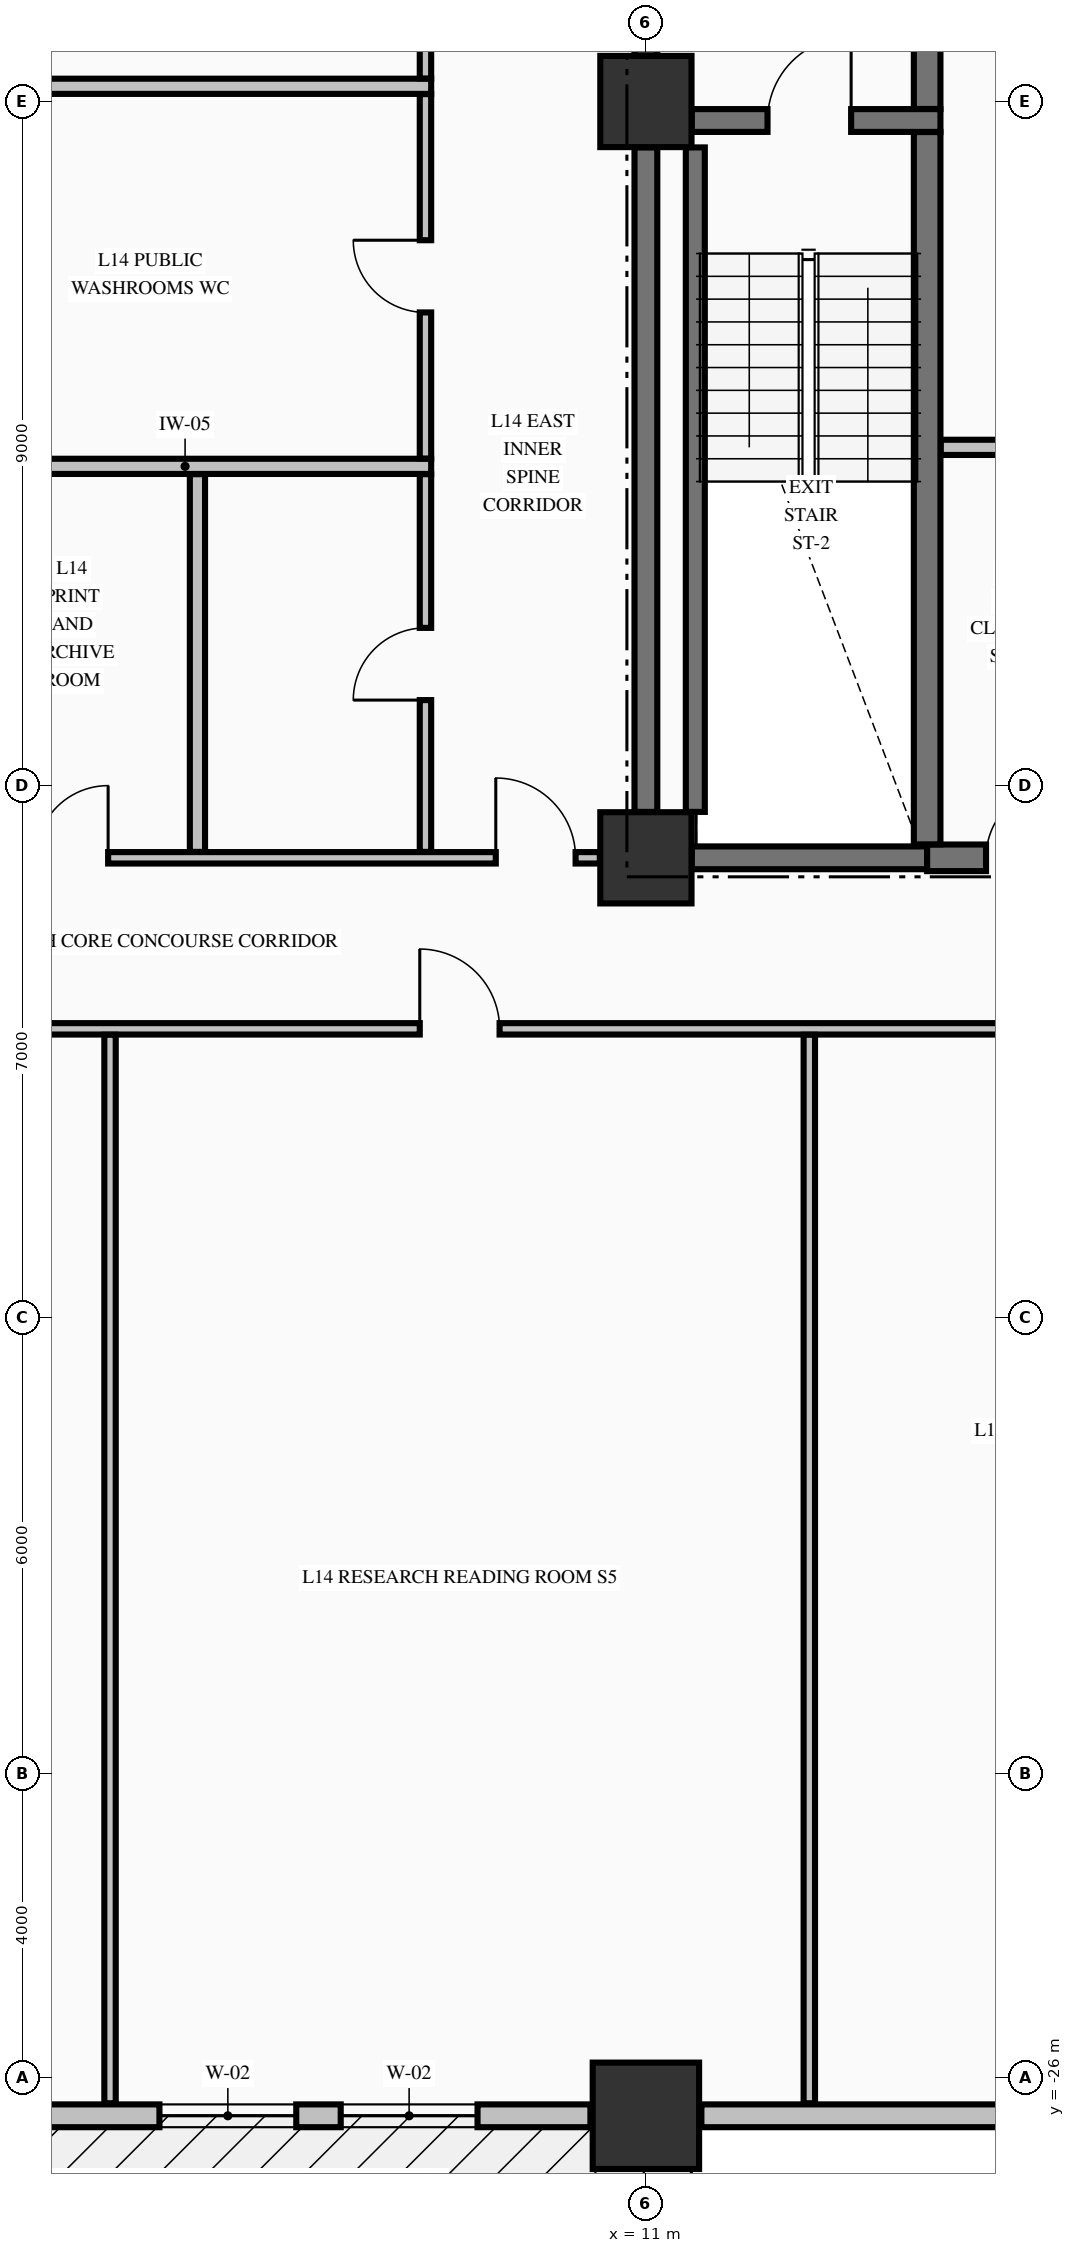
"""IFC4 building model, lengths in metres.
Left out: names, types, materials, properties, quantities, classifications, styles, units other than length and angle.
Written with IfcOpenShell. Run it as: python <this file> out.ifc"""

import sys

from ifc_helpers import new_model, si_unit, direction, frame, frame_2d, origin, origin_2d, place, context, subcontext, project, spatial, rectangle, extrude, element, fill, save


model = new_model("IFC4")
c1 = context("Model", 3, precision=1e-05, world=origin(), true_north=direction((0.0, 1.0)))
c2 = subcontext(c1, "Body", "Model", "MODEL_VIEW")
j1 = project(units=[si_unit("LENGTHUNIT", "METRE"), si_unit("PLANEANGLEUNIT", "RADIAN")], contexts=[c1])
p1 = place(None, origin())
s1 = spatial("IfcSite", under=j1, at=p1, CompositionType="ELEMENT")
p2 = place(p1, origin())
s2 = spatial("IfcBuilding", under=s1, at=p2, CompositionType="ELEMENT")
p3 = place(p2, frame((0.0, 0.0, 60.76)))
s3 = spatial("IfcBuildingStorey", under=s2, at=p3, CompositionType="ELEMENT", Elevation=60.76)
p4 = place(p3, frame((11.0, -26.5, -0.3), z_axis=(0.0, 0.0, 1.0), x_axis=(1.0, 0.0, 0.0)))
e1 = element("IfcColumn", 1, at=p4, inside=s3, PredefinedType="COLUMN", context=c2, shape_type="SweptSolid", body=[
    extrude(rectangle(XDim=1.4, YDim=1.4, at=origin_2d()), origin(), (0.0, 0.0, 1.0), 3.62),
])
for number, where, z_axis, x_axis in (
    (2, (11.0, -9.95, -0.3), (0.0, 0.0, 1.0), (1.0, 0.0, 0.0)),
    (3, (11.0, 0.0, -0.3), (0.0, 0.0, 1.0), (1.0, 0.0, 0.0)),
):
    element("IfcColumn", number, at=place(p3, frame(where, z_axis=z_axis, x_axis=x_axis)), inside=s3, PredefinedType="COLUMN", context=c2, shape_type="SweptSolid", body=[
        extrude(rectangle(XDim=1.2, YDim=1.2, at=origin_2d()), origin(), (0.0, 0.0, 1.0), 3.62),
    ])
p5 = place(p3, frame((0.73, -26.5, 0.0), z_axis=(0.0, 0.0, 1.0), x_axis=(1.0, 0.0, 0.0)))
e4 = element("IfcWall", 4, at=p5, inside=s3, PredefinedType="STANDARD", context=c2, shape_type="SweptSolid", body=[
    extrude(rectangle(XDim=9.54, YDim=0.3, at=frame_2d((4.77, 0.0))), origin(), (0.0, 0.0, 1.0), 2.712),
])
p6 = place(p5, frame((3.87, 0.0, 0.78)))
e5 = element("IfcOpeningElement", 5, at=p6, cuts=e4, PredefinedType="OPENING", context=c2, shape_type="SweptSolid", body=[
    extrude(rectangle(XDim=1.8, YDim=1.72, at=frame_2d((0.9, 0.86))), frame((0.0, 0.16, 0.0), z_axis=(0.0, -1.0, 0.0), x_axis=(1.0, 0.0, 0.0)), (0.0, 0.0, 1.0), 0.32),
])
p7 = place(p5, frame((6.255, 0.0, 0.78)))
e6 = element("IfcOpeningElement", 6, at=p7, cuts=e4, PredefinedType="OPENING", context=c2, shape_type="SweptSolid", body=[
    extrude(rectangle(XDim=1.8, YDim=1.72, at=frame_2d((0.9, 0.86))), frame((0.0, 0.16, 0.0), z_axis=(0.0, -1.0, 0.0), x_axis=(1.0, 0.0, 0.0)), (0.0, 0.0, 1.0), 0.32),
])
p8 = place(p3, frame((11.73, -26.5, 0.0), z_axis=(0.0, 0.0, 1.0), x_axis=(1.0, 0.0, 0.0)))
e7 = element("IfcWall", 7, at=p8, inside=s3, PredefinedType="STANDARD", context=c2, shape_type="SweptSolid", body=[
    extrude(rectangle(XDim=8.04, YDim=0.3, at=frame_2d((4.02, 0.0))), origin(), (0.0, 0.0, 1.0), 2.712),
])
p9 = place(p3, frame((11.604, -9.95, 0.0), z_axis=(0.0, 0.0, 1.0), x_axis=(1.0, 0.0, 0.0)))
e8 = element("IfcWall", 8, at=p9, inside=s3, PredefinedType="SHEAR", context=c2, shape_type="SweptSolid", body=[
    extrude(rectangle(XDim=3.096, YDim=0.3, at=frame_2d((1.548, 0.0))), origin(), (0.0, 0.0, 1.0), 3.32),
])
p10 = place(p3, frame((14.7, -9.95, 0.0), z_axis=(0.0, 0.0, 1.0), x_axis=(1.0, 0.0, 0.0)))
e9 = element("IfcWall", 9, at=p10, inside=s3, PredefinedType="SHEAR", context=c2, shape_type="SweptSolid", body=[
    extrude(rectangle(XDim=4.696, YDim=0.35, at=frame_2d((2.348, 0.0))), origin(), (0.0, 0.0, 1.0), 3.32),
])
p11 = place(p10, frame((0.775, 0.0, 0.0)))
e10 = element("IfcOpeningElement", 10, at=p11, cuts=e9, PredefinedType="OPENING", context=c2, shape_type="SweptSolid", body=[
    extrude(rectangle(XDim=0.95, YDim=2.15, at=frame_2d((0.475, 1.075))), frame((0.0, 0.185, 0.0), z_axis=(0.0, -1.0, 0.0), x_axis=(1.0, 0.0, 0.0)), (0.0, 0.0, 1.0), 0.37),
])
p12 = place(p3, frame((11.604, -0.25, 0.0), z_axis=(0.0, 0.0, 1.0), x_axis=(1.0, 0.0, 0.0)))
e11 = element("IfcWall", 11, at=p12, inside=s3, PredefinedType="SHEAR", context=c2, shape_type="SweptSolid", body=[
    extrude(rectangle(XDim=3.271, YDim=0.3, at=frame_2d((1.635, 0.0))), origin(), (0.0, 0.0, 1.0), 3.32),
])
p13 = place(p12, frame((0.996, 0.0, 0.0)))
e12 = element("IfcOpeningElement", 12, at=p13, cuts=e11, PredefinedType="OPENING", context=c2, shape_type="SweptSolid", body=[
    extrude(rectangle(XDim=1.1, YDim=2.15, at=frame_2d((0.55, 1.075))), frame((0.0, 0.16, 0.0), z_axis=(0.0, -1.0, 0.0), x_axis=(1.0, 0.0, 0.0)), (0.0, 0.0, 1.0), 0.32),
])
p14 = place(p3, frame((-28.835, -12.2, 0.0), z_axis=(0.0, 0.0, 1.0), x_axis=(1.0, 0.0, 0.0)))
e13 = element("IfcWall", 13, at=p14, inside=s3, PredefinedType="PARTITIONING", context=c2, shape_type="SweptSolid", body=[
    extrude(rectangle(XDim=52.67, YDim=0.15, at=frame_2d((26.335, 0.0))), origin(), (0.0, 0.0, 1.0), 3.32),
])
p15 = place(p14, frame((10.99, 0.0, 0.0)))
e14 = element("IfcOpeningElement", 14, at=p15, cuts=e13, PredefinedType="OPENING", context=c2, shape_type="SweptSolid", body=[
    extrude(rectangle(XDim=1.05, YDim=2.15, at=frame_2d((0.525, 1.075))), frame((0.0, 0.085, 0.0), z_axis=(0.0, -1.0, 0.0), x_axis=(1.0, 0.0, 0.0)), (0.0, 0.0, 1.0), 0.17),
])
p16 = place(p14, frame((18.86, 0.0, 0.0)))
e15 = element("IfcOpeningElement", 15, at=p16, cuts=e13, PredefinedType="OPENING", context=c2, shape_type="SweptSolid", body=[
    extrude(rectangle(XDim=0.95, YDim=2.15, at=frame_2d((0.475, 1.075))), frame((0.0, 0.085, 0.0), z_axis=(0.0, -1.0, 0.0), x_axis=(1.0, 0.0, 0.0)), (0.0, 0.0, 1.0), 0.17),
])
p17 = place(p14, frame((23.21, 0.0, 0.0)))
e16 = element("IfcOpeningElement", 16, at=p17, cuts=e13, PredefinedType="OPENING", context=c2, shape_type="SweptSolid", body=[
    extrude(rectangle(XDim=0.95, YDim=2.15, at=frame_2d((0.475, 1.075))), frame((0.0, 0.085, 0.0), z_axis=(0.0, -1.0, 0.0), x_axis=(1.0, 0.0, 0.0)), (0.0, 0.0, 1.0), 0.17),
])
p18 = place(p14, frame((27.56, 0.0, 0.0)))
e17 = element("IfcOpeningElement", 17, at=p18, cuts=e13, PredefinedType="OPENING", context=c2, shape_type="SweptSolid", body=[
    extrude(rectangle(XDim=0.95, YDim=2.15, at=frame_2d((0.475, 1.075))), frame((0.0, 0.085, 0.0), z_axis=(0.0, -1.0, 0.0), x_axis=(1.0, 0.0, 0.0)), (0.0, 0.0, 1.0), 0.17),
])
p19 = place(p14, frame((36.86, 0.0, 0.0)))
e18 = element("IfcOpeningElement", 18, at=p19, cuts=e13, PredefinedType="OPENING", context=c2, shape_type="SweptSolid", body=[
    extrude(rectangle(XDim=1.05, YDim=2.15, at=frame_2d((0.525, 1.075))), frame((0.0, 0.085, 0.0), z_axis=(0.0, -1.0, 0.0), x_axis=(1.0, 0.0, 0.0)), (0.0, 0.0, 1.0), 0.17),
])
p20 = place(p14, frame((44.84, 0.0, 0.0)))
e19 = element("IfcOpeningElement", 19, at=p20, cuts=e13, PredefinedType="OPENING", context=c2, shape_type="SweptSolid", body=[
    extrude(rectangle(XDim=0.95, YDim=2.15, at=frame_2d((0.475, 1.075))), frame((0.0, 0.085, 0.0), z_axis=(0.0, -1.0, 0.0), x_axis=(1.0, 0.0, 0.0)), (0.0, 0.0, 1.0), 0.17),
])
p21 = place(p3, frame((-10.394, -9.95, 0.0), z_axis=(0.0, 0.0, 1.0), x_axis=(1.0, 0.0, 0.0)))
e20 = element("IfcWall", 20, at=p21, inside=s3, PredefinedType="PARTITIONING", context=c2, shape_type="SweptSolid", body=[
    extrude(rectangle(XDim=20.788, YDim=0.15, at=frame_2d((10.394, 0.0))), origin(), (0.0, 0.0, 1.0), 3.32),
])
p22 = place(p21, frame((0.319, 0.0, 0.0)))
e21 = element("IfcOpeningElement", 21, at=p22, cuts=e20, PredefinedType="OPENING", context=c2, shape_type="SweptSolid", body=[
    extrude(rectangle(XDim=1.05, YDim=2.15, at=frame_2d((0.525, 1.075))), frame((0.0, 0.085, 0.0), z_axis=(0.0, -1.0, 0.0), x_axis=(1.0, 0.0, 0.0)), (0.0, 0.0, 1.0), 0.17),
])
p23 = place(p21, frame((19.419, 0.0, 0.0)))
e22 = element("IfcOpeningElement", 22, at=p23, cuts=e20, PredefinedType="OPENING", context=c2, shape_type="SweptSolid", body=[
    extrude(rectangle(XDim=1.05, YDim=2.15, at=frame_2d((0.525, 1.075))), frame((0.0, 0.085, 0.0), z_axis=(0.0, -1.0, 0.0), x_axis=(1.0, 0.0, 0.0)), (0.0, 0.0, 1.0), 0.17),
])
p24 = place(p21, frame((13.369, 0.0, 0.0)))
e23 = element("IfcOpeningElement", 23, at=p24, cuts=e20, PredefinedType="OPENING", context=c2, shape_type="SweptSolid", body=[
    extrude(rectangle(XDim=0.95, YDim=2.15, at=frame_2d((0.475, 1.075))), frame((0.0, 0.085, 0.0), z_axis=(0.0, -1.0, 0.0), x_axis=(1.0, 0.0, 0.0)), (0.0, 0.0, 1.0), 0.17),
])
p25 = place(p3, frame((1.7, -4.8, 0.0), z_axis=(0.0, 0.0, 1.0), x_axis=(1.0, 0.0, 0.0)))
e24 = element("IfcWall", 24, at=p25, inside=s3, PredefinedType="PARTITIONING", context=c2, shape_type="SweptSolid", body=[
    extrude(rectangle(XDim=6.475, YDim=0.2, at=frame_2d((3.238, 0.0))), origin(), (0.0, 0.0, 1.0), 3.32),
])
p26 = place(p3, frame((14.878, -4.55, 0.0), z_axis=(0.0, 0.0, 1.0), x_axis=(1.0, 0.0, 0.0)))
e25 = element("IfcWall", 25, at=p26, inside=s3, PredefinedType="PARTITIONING", context=c2, shape_type="SweptSolid", body=[
    extrude(rectangle(XDim=2.272, YDim=0.2, at=frame_2d((1.136, 0.0))), origin(), (0.0, 0.0, 1.0), 3.32),
])
p27 = place(p3, frame((1.7, 0.2, 0.0), z_axis=(0.0, 0.0, 1.0), x_axis=(1.0, 0.0, 0.0)))
e26 = element("IfcWall", 26, at=p27, inside=s3, PredefinedType="PARTITIONING", context=c2, shape_type="SweptSolid", body=[
    extrude(rectangle(XDim=6.475, YDim=0.2, at=frame_2d((3.238, 0.0))), origin(), (0.0, 0.0, 1.0), 3.32),
])
p28 = place(p3, frame((11.0, -9.346, 0.0), z_axis=(0.0, 0.0, 1.0), x_axis=(0.0, 1.0, 0.0)))
e27 = element("IfcWall", 27, at=p28, inside=s3, PredefinedType="SHEAR", context=c2, shape_type="SweptSolid", body=[
    extrude(rectangle(XDim=8.742, YDim=0.3, at=frame_2d((4.371, 0.0))), origin(), (0.0, 0.0, 1.0), 3.32),
])
p29 = place(p3, frame((11.0, 0.604, 0.0), z_axis=(0.0, 0.0, 1.0), x_axis=(0.0, 1.0, 0.0)))
e28 = element("IfcWall", 28, at=p29, inside=s3, PredefinedType="SHEAR", context=c2, shape_type="SweptSolid", body=[
    extrude(rectangle(XDim=2.144, YDim=0.3, at=frame_2d((1.072, 0.0))), origin(), (0.0, 0.0, 1.0), 3.32),
])
p30 = place(p29, frame((0.496, 0.0, 0.0)))
e29 = element("IfcOpeningElement", 29, at=p30, cuts=e28, PredefinedType="OPENING", context=c2, shape_type="SweptSolid", body=[
    extrude(rectangle(XDim=1.1, YDim=2.15, at=frame_2d((0.55, 1.075))), frame((0.0, 0.16, 0.0), z_axis=(0.0, -1.0, 0.0), x_axis=(1.0, 0.0, 0.0)), (0.0, 0.0, 1.0), 0.32),
])
p31 = place(p3, frame((11.65, -9.346, 0.0), z_axis=(0.0, 0.0, 1.0), x_axis=(0.0, 1.0, 0.0)))
e30 = element("IfcWall", 30, at=p31, inside=s3, PredefinedType="SOLIDWALL", context=c2, shape_type="SweptSolid", body=[
    extrude(rectangle(XDim=8.742, YDim=0.25, at=frame_2d((4.371, 0.0))), origin(), (0.0, 0.0, 1.0), 3.32),
])
p32 = place(p3, frame((14.7, -9.773, 0.0), z_axis=(0.0, 0.0, 1.0), x_axis=(0.0, 1.0, 0.0)))
e31 = element("IfcWall", 31, at=p32, inside=s3, PredefinedType="SHEAR", context=c2, shape_type="SweptSolid", body=[
    extrude(rectangle(XDim=9.371, YDim=0.35, at=frame_2d((4.686, 0.0))), origin(), (0.0, 0.0, 1.0), 3.32),
])
p33 = place(p3, frame((14.7, -0.098, 0.0), z_axis=(0.0, 0.0, 1.0), x_axis=(0.0, 1.0, 0.0)))
e32 = element("IfcWall", 32, at=p33, inside=s3, PredefinedType="SHEAR", context=c2, shape_type="SweptSolid", body=[
    extrude(rectangle(XDim=2.846, YDim=0.35, at=frame_2d((1.423, 0.0))), origin(), (0.0, 0.0, 1.0), 3.32),
])
p34 = place(p3, frame((3.95, -26.335, 0.0), z_axis=(0.0, 0.0, 1.0), x_axis=(0.0, 1.0, 0.0)))
e33 = element("IfcWall", 33, at=p34, inside=s3, PredefinedType="PARTITIONING", context=c2, shape_type="SweptSolid", body=[
    extrude(rectangle(XDim=14.057, YDim=0.15, at=frame_2d((7.028, 0.0))), origin(), (0.0, 0.0, 1.0), 3.32),
])
p35 = place(p3, frame((5.1, -9.872, 0.0), z_axis=(0.0, 0.0, 1.0), x_axis=(0.0, 1.0, 0.0)))
e34 = element("IfcWall", 34, at=p35, inside=s3, PredefinedType="PARTITIONING", context=c2, shape_type="SweptSolid", body=[
    extrude(rectangle(XDim=4.969, YDim=0.2, at=frame_2d((2.484, 0.0))), origin(), (0.0, 0.0, 1.0), 3.32),
])
p36 = place(p3, frame((8.1, -9.872, 0.0), z_axis=(0.0, 0.0, 1.0), x_axis=(0.0, 1.0, 0.0)))
e35 = element("IfcWall", 35, at=p36, inside=s3, PredefinedType="PARTITIONING", context=c2, shape_type="SweptSolid", body=[
    extrude(rectangle(XDim=4.969, YDim=0.15, at=frame_2d((2.484, 0.0))), origin(), (0.0, 0.0, 1.0), 3.32),
])
p37 = place(p36, frame((1.997, 0.0, 0.0)))
e36 = element("IfcOpeningElement", 36, at=p37, cuts=e35, PredefinedType="OPENING", context=c2, shape_type="SweptSolid", body=[
    extrude(rectangle(XDim=0.95, YDim=2.15, at=frame_2d((0.475, 1.075))), frame((0.0, 0.085, 0.0), z_axis=(0.0, -1.0, 0.0), x_axis=(1.0, 0.0, 0.0)), (0.0, 0.0, 1.0), 0.17),
])
p38 = place(p3, frame((8.1, -4.697, 0.0), z_axis=(0.0, 0.0, 1.0), x_axis=(0.0, 1.0, 0.0)))
e37 = element("IfcWall", 37, at=p38, inside=s3, PredefinedType="PARTITIONING", context=c2, shape_type="SweptSolid", body=[
    extrude(rectangle(XDim=4.794, YDim=0.15, at=frame_2d((2.397, 0.0))), origin(), (0.0, 0.0, 1.0), 3.32),
])
p39 = place(p38, frame((1.922, 0.0, 0.0)))
e38 = element("IfcOpeningElement", 38, at=p39, cuts=e37, PredefinedType="OPENING", context=c2, shape_type="SweptSolid", body=[
    extrude(rectangle(XDim=0.95, YDim=2.15, at=frame_2d((0.475, 1.075))), frame((0.0, 0.085, 0.0), z_axis=(0.0, -1.0, 0.0), x_axis=(1.0, 0.0, 0.0)), (0.0, 0.0, 1.0), 0.17),
])
p40 = place(p3, frame((8.1, 0.303, 0.0), z_axis=(0.0, 0.0, 1.0), x_axis=(0.0, 1.0, 0.0)))
e39 = element("IfcWall", 39, at=p40, inside=s3, PredefinedType="PARTITIONING", context=c2, shape_type="SweptSolid", body=[
    extrude(rectangle(XDim=10.119, YDim=0.15, at=frame_2d((5.06, 0.0))), origin(), (0.0, 0.0, 1.0), 3.32),
])
p41 = place(p40, frame((4.497, 0.0, 0.0)))
e40 = element("IfcOpeningElement", 40, at=p41, cuts=e39, PredefinedType="OPENING", context=c2, shape_type="SweptSolid", body=[
    extrude(rectangle(XDim=1.1, YDim=2.15, at=frame_2d((0.55, 1.075))), frame((0.0, 0.085, 0.0), z_axis=(0.0, -1.0, 0.0), x_axis=(1.0, 0.0, 0.0)), (0.0, 0.0, 1.0), 0.17),
])
p42 = place(p3, frame((13.15, -26.335, 0.0), z_axis=(0.0, 0.0, 1.0), x_axis=(0.0, 1.0, 0.0)))
e41 = element("IfcWall", 41, at=p42, inside=s3, PredefinedType="PARTITIONING", context=c2, shape_type="SweptSolid", body=[
    extrude(rectangle(XDim=14.057, YDim=0.15, at=frame_2d((7.028, 0.0))), origin(), (0.0, 0.0, 1.0), 3.32),
])
p43 = place(p6, origin())
e42 = element("IfcWindow", 42, at=p43, inside=s3, PartitioningType="SINGLE_PANEL", PredefinedType="WINDOW", context=c2, shape_type="SweptSolid", body=[
    extrude(rectangle(XDim=1.8, YDim=1.72, at=frame_2d((0.9, 0.86))), frame((0.0, 0.03, 0.0), z_axis=(0.0, -1.0, 0.0), x_axis=(1.0, 0.0, 0.0)), (0.0, 0.0, 1.0), 0.06),
])
fill(e5, e42)
p44 = place(p7, origin())
e43 = element("IfcWindow", 43, at=p44, inside=s3, PartitioningType="SINGLE_PANEL", PredefinedType="WINDOW", context=c2, shape_type="SweptSolid", body=[
    extrude(rectangle(XDim=1.8, YDim=1.72, at=frame_2d((0.9, 0.86))), frame((0.0, 0.03, 0.0), z_axis=(0.0, -1.0, 0.0), x_axis=(1.0, 0.0, 0.0)), (0.0, 0.0, 1.0), 0.06),
])
fill(e6, e43)
p45 = place(p13, origin())
e44 = element("IfcDoor", 44, at=p45, inside=s3, OperationType="SINGLE_SWING_RIGHT", PredefinedType="DOOR", context=c2, shape_type="SweptSolid", body=[
    extrude(rectangle(XDim=1.1, YDim=2.15, at=frame_2d((0.55, 1.075))), frame((0.0, 0.025, 0.0), z_axis=(0.0, -1.0, 0.0), x_axis=(1.0, 0.0, 0.0)), (0.0, 0.0, 1.0), 0.05),
])
fill(e12, e44)
p46 = place(p11, origin())
e45 = element("IfcDoor", 45, at=p46, inside=s3, OperationType="SINGLE_SWING_RIGHT", PredefinedType="DOOR", context=c2, shape_type="SweptSolid", body=[
    extrude(rectangle(XDim=0.95, YDim=2.15, at=frame_2d((0.475, 1.075))), frame((0.0, 0.025, 0.0), z_axis=(0.0, -1.0, 0.0), x_axis=(1.0, 0.0, 0.0)), (0.0, 0.0, 1.0), 0.05),
])
fill(e10, e45)
p47 = place(p23, origin())
e46 = element("IfcDoor", 46, at=p47, inside=s3, OperationType="SINGLE_SWING_LEFT", PredefinedType="DOOR", context=c2, shape_type="SweptSolid", body=[
    extrude(rectangle(XDim=1.05, YDim=2.15, at=frame_2d((0.525, 1.075))), frame((0.0, 0.025, 0.0), z_axis=(0.0, -1.0, 0.0), x_axis=(1.0, 0.0, 0.0)), (0.0, 0.0, 1.0), 0.05),
])
fill(e22, e46)
p48 = place(p19, origin())
e47 = element("IfcDoor", 47, at=p48, inside=s3, OperationType="SINGLE_SWING_LEFT", PredefinedType="DOOR", context=c2, shape_type="SweptSolid", body=[
    extrude(rectangle(XDim=1.05, YDim=2.15, at=frame_2d((0.525, 1.075))), frame((0.0, 0.025, 0.0), z_axis=(0.0, -1.0, 0.0), x_axis=(1.0, 0.0, 0.0)), (0.0, 0.0, 1.0), 0.05),
])
fill(e18, e47)
p49 = place(p39, origin())
e48 = element("IfcDoor", 48, at=p49, inside=s3, OperationType="SINGLE_SWING_RIGHT", PredefinedType="DOOR", context=c2, shape_type="SweptSolid", body=[
    extrude(rectangle(XDim=0.95, YDim=2.15, at=frame_2d((0.475, 1.075))), frame((0.0, 0.025, 0.0), z_axis=(0.0, -1.0, 0.0), x_axis=(1.0, 0.0, 0.0)), (0.0, 0.0, 1.0), 0.05),
])
fill(e38, e48)
p50 = place(p37, origin())
e49 = element("IfcDoor", 49, at=p50, inside=s3, OperationType="SINGLE_SWING_LEFT", PredefinedType="DOOR", context=c2, shape_type="SweptSolid", body=[
    extrude(rectangle(XDim=0.95, YDim=2.15, at=frame_2d((0.475, 1.075))), frame((0.0, 0.025, 0.0), z_axis=(0.0, -1.0, 0.0), x_axis=(1.0, 0.0, 0.0)), (0.0, 0.0, 1.0), 0.05),
])
fill(e36, e49)
p51 = place(p24, origin())
e50 = element("IfcDoor", 50, at=p51, inside=s3, OperationType="SINGLE_SWING_RIGHT", PredefinedType="DOOR", context=c2, shape_type="SweptSolid", body=[
    extrude(rectangle(XDim=0.95, YDim=2.15, at=frame_2d((0.475, 1.075))), frame((0.0, 0.025, 0.0), z_axis=(0.0, -1.0, 0.0), x_axis=(1.0, 0.0, 0.0)), (0.0, 0.0, 1.0), 0.05),
])
fill(e23, e50)
save(model, sys.argv[1])
